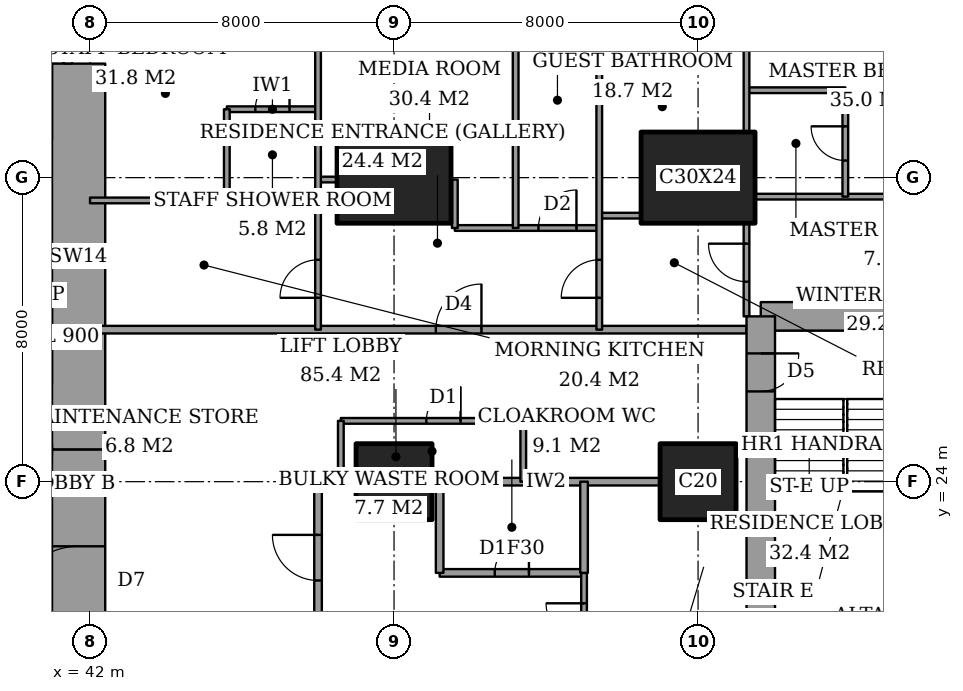
"""IFC4 building model, lengths in metres.
Left out: names, types, materials, properties, quantities, classifications, styles, units other than length and angle.
Written with IfcOpenShell. Run it as: python <this file> out.ifc"""

import sys

from ifc_helpers import new_model, si_unit, direction, frame, frame_2d, origin, origin_2d, place, context, subcontext, project, spatial, rectangle, extrude, element, fill, save


model = new_model("IFC4")
c1 = context("Model", 3, precision=1e-05, world=origin(), true_north=direction((0.0, 1.0)))
c2 = subcontext(c1, "Body", "Model", "MODEL_VIEW")
j1 = project(units=[si_unit("LENGTHUNIT", "METRE"), si_unit("PLANEANGLEUNIT", "RADIAN")], contexts=[c1])
p1 = place(None, origin())
s1 = spatial("IfcSite", under=j1, at=p1, CompositionType="ELEMENT")
p2 = place(p1, origin())
s2 = spatial("IfcBuilding", under=s1, at=p2, CompositionType="ELEMENT")
p3 = place(p2, frame((0.0, 0.0, 135.8)))
s3 = spatial("IfcBuildingStorey", under=s2, at=p3, CompositionType="ELEMENT", Elevation=135.8)
p4 = place(p3, frame((50.0, 24.0, 0.0), z_axis=(0.0, 0.0, 1.0), x_axis=(1.0, 0.0, 0.0)))
e1 = element("IfcColumn", 1, at=p4, inside=s3, PredefinedType="COLUMN", context=c2, shape_type="SweptSolid", body=[
    extrude(rectangle(XDim=2.0, YDim=2.0, at=origin_2d()), origin(), (0.0, 0.0, 1.0), 3.6),
])
p5 = place(p3, frame((50.0, 32.0, 0.0), z_axis=(0.0, 0.0, 1.0), x_axis=(1.0, 0.0, 0.0)))
e2 = element("IfcColumn", 2, at=p5, inside=s3, PredefinedType="COLUMN", context=c2, shape_type="SweptSolid", body=[
    extrude(rectangle(XDim=3.0, YDim=2.4, at=origin_2d()), origin(), (0.0, 0.0, 1.0), 3.6),
])
p6 = place(p3, frame((58.0, 24.0, 0.0), z_axis=(0.0, 0.0, 1.0), x_axis=(1.0, 0.0, 0.0)))
e3 = element("IfcColumn", 3, at=p6, inside=s3, PredefinedType="COLUMN", context=c2, shape_type="SweptSolid", body=[
    extrude(rectangle(XDim=2.0, YDim=2.0, at=origin_2d()), origin(), (0.0, 0.0, 1.0), 3.6),
])
p7 = place(p3, frame((58.0, 32.0, 0.0), z_axis=(0.0, 0.0, 1.0), x_axis=(1.0, 0.0, 0.0)))
e4 = element("IfcColumn", 4, at=p7, inside=s3, PredefinedType="COLUMN", context=c2, shape_type="SweptSolid", body=[
    extrude(rectangle(XDim=3.0, YDim=2.4, at=origin_2d()), origin(), (0.0, 0.0, 1.0), 3.6),
])
p8 = place(p3, frame((41.7, 13.0, 0.0), z_axis=(0.0, 0.0, 1.0), x_axis=(0.0, 1.0, 0.0)))
e5 = element("IfcWall", 5, at=p8, inside=s3, PredefinedType="SHEAR", context=c2, shape_type="SweptSolid", body=[
    extrude(rectangle(XDim=11.85, YDim=1.4, at=frame_2d((5.925, 0.0))), origin(), (0.0, 0.0, 1.0), 3.6),
])
p9 = place(p8, frame((7.5, 0.0, 0.0)))
e6 = element("IfcOpeningElement", 6, at=p9, cuts=e5, PredefinedType="OPENING", context=c2, shape_type="SweptSolid", body=[
    extrude(rectangle(XDim=1.8, YDim=2.4, at=frame_2d((0.9, 1.2))), frame((0.0, 0.71, 0.0), z_axis=(0.0, -1.0, 0.0), x_axis=(1.0, 0.0, 0.0)), (0.0, 0.0, 1.0), 1.42),
])
p10 = place(p3, frame((41.7, 24.85, 0.0), z_axis=(0.0, 0.0, 1.0), x_axis=(0.0, 1.0, 0.0)))
e7 = element("IfcWall", 7, at=p10, inside=s3, PredefinedType="SHEAR", context=c2, shape_type="SweptSolid", body=[
    extrude(rectangle(XDim=10.15, YDim=1.4, at=frame_2d((5.075, 0.0))), origin(), (0.0, 0.0, 1.0), 3.6),
])
p11 = place(p3, frame((64.1, 28.35, 0.0), z_axis=(0.0, 0.0, 1.0), x_axis=(-1.0, 0.0, 0.0)))
e8 = element("IfcWall", 8, at=p11, inside=s3, PredefinedType="SHEAR", context=c2, shape_type="SweptSolid", body=[
    extrude(rectangle(XDim=4.45, YDim=0.75, at=frame_2d((2.225, 0.0))), origin(), (0.0, 0.0, 1.0), 3.6),
])
p12 = place(p3, frame((59.65, 28.35, 0.0), z_axis=(0.0, 0.0, 1.0), x_axis=(0.0, -1.0, 0.0)))
e9 = element("IfcWall", 9, at=p12, inside=s3, PredefinedType="SHEAR", context=c2, shape_type="SweptSolid", body=[
    extrude(rectangle(XDim=8.7, YDim=0.75, at=frame_2d((4.35, 0.0))), origin(), (0.0, 0.0, 1.0), 3.6),
])
p13 = place(p12, frame((0.975, 0.0, 0.0)))
e10 = element("IfcOpeningElement", 10, at=p13, cuts=e9, PredefinedType="OPENING", context=c2, shape_type="SweptSolid", body=[
    extrude(rectangle(XDim=1.0, YDim=2.1, at=frame_2d((0.5, 1.05))), frame((0.0, 0.385, 0.0), z_axis=(0.0, -1.0, 0.0), x_axis=(1.0, 0.0, 0.0)), (0.0, 0.0, 1.0), 0.77),
])
p14 = place(p3, frame((51.2, 21.6, 0.0), z_axis=(0.0, 0.0, 1.0), x_axis=(1.0, 0.0, 0.0)))
e11 = element("IfcWall", 11, at=p14, inside=s3, PredefinedType="PARTITIONING", context=c2, shape_type="SweptSolid", body=[
    extrude(rectangle(XDim=3.8, YDim=0.2, at=frame_2d((1.9, 0.0))), origin(), (0.0, 0.0, 1.0), 3.35),
])
p15 = place(p14, frame((1.45, 0.0, 0.0)))
e12 = element("IfcOpeningElement", 12, at=p15, cuts=e11, PredefinedType="OPENING", context=c2, shape_type="SweptSolid", body=[
    extrude(rectangle(XDim=0.9, YDim=2.1, at=frame_2d((0.45, 1.05))), frame((0.0, 0.11, 0.0), z_axis=(0.0, -1.0, 0.0), x_axis=(1.0, 0.0, 0.0)), (0.0, 0.0, 1.0), 0.22),
])
p16 = place(p3, frame((48.0, 24.0, 0.0), z_axis=(0.0, 0.0, 1.0), x_axis=(1.0, 0.0, 0.0)))
e13 = element("IfcWall", 13, at=p16, inside=s3, PredefinedType="PARTITIONING", context=c2, shape_type="SweptSolid", body=[
    extrude(rectangle(XDim=1.0, YDim=0.2, at=frame_2d((0.5, 0.0))), origin(), (0.0, 0.0, 1.0), 3.35),
])
p17 = place(p3, frame((51.0, 24.0, 0.0), z_axis=(0.0, 0.0, 1.0), x_axis=(1.0, 0.0, 0.0)))
e14 = element("IfcWall", 14, at=p17, inside=s3, PredefinedType="PARTITIONING", context=c2, shape_type="SweptSolid", body=[
    extrude(rectangle(XDim=6.0, YDim=0.2, at=frame_2d((3.0, 0.0))), origin(), (0.0, 0.0, 1.0), 3.35),
])
p18 = place(p3, frame((48.6, 25.6, 0.0), z_axis=(0.0, 0.0, 1.0), x_axis=(1.0, 0.0, 0.0)))
e15 = element("IfcWall", 15, at=p18, inside=s3, PredefinedType="PARTITIONING", context=c2, shape_type="SweptSolid", body=[
    extrude(rectangle(XDim=4.8, YDim=0.15, at=frame_2d((2.4, 0.0))), origin(), (0.0, 0.0, 1.0), 3.35),
])
p19 = place(p18, frame((2.25, 0.0, 0.0)))
e16 = element("IfcOpeningElement", 16, at=p19, cuts=e15, PredefinedType="OPENING", context=c2, shape_type="SweptSolid", body=[
    extrude(rectangle(XDim=0.9, YDim=2.1, at=frame_2d((0.45, 1.05))), frame((0.0, 0.085, 0.0), z_axis=(0.0, -1.0, 0.0), x_axis=(1.0, 0.0, 0.0)), (0.0, 0.0, 1.0), 0.17),
])
p20 = place(p3, frame((42.0, 28.0, 0.0), z_axis=(0.0, 0.0, 1.0), x_axis=(1.0, 0.0, 0.0)))
e17 = element("IfcWall", 17, at=p20, inside=s3, PredefinedType="PARTITIONING", context=c2, shape_type="SweptSolid", body=[
    extrude(rectangle(XDim=17.275, YDim=0.2, at=frame_2d((8.637, 0.0))), origin(), (0.0, 0.0, 1.0), 3.35),
])
p21 = place(p20, frame((9.1, 0.0, 0.0)))
e18 = element("IfcOpeningElement", 18, at=p21, cuts=e17, PredefinedType="OPENING", context=c2, shape_type="SweptSolid", body=[
    extrude(rectangle(XDim=1.2, YDim=2.4, at=frame_2d((0.6, 1.2))), frame((0.0, 0.11, 0.0), z_axis=(0.0, -1.0, 0.0), x_axis=(1.0, 0.0, 0.0)), (0.0, 0.0, 1.0), 0.22),
])
p22 = place(p3, frame((51.6, 30.675, 0.0), z_axis=(0.0, 0.0, 1.0), x_axis=(1.0, 0.0, 0.0)))
e19 = element("IfcWall", 19, at=p22, inside=s3, PredefinedType="PARTITIONING", context=c2, shape_type="SweptSolid", body=[
    extrude(rectangle(XDim=3.8, YDim=0.15, at=frame_2d((1.9, 0.0))), origin(), (0.0, 0.0, 1.0), 3.35),
])
p23 = place(p22, frame((2.2, 0.0, 0.0)))
e20 = element("IfcOpeningElement", 20, at=p23, cuts=e19, PredefinedType="OPENING", context=c2, shape_type="SweptSolid", body=[
    extrude(rectangle(XDim=1.0, YDim=2.1, at=frame_2d((0.5, 1.05))), frame((0.0, 0.085, 0.0), z_axis=(0.0, -1.0, 0.0), x_axis=(1.0, 0.0, 0.0)), (0.0, 0.0, 1.0), 0.17),
])
p24 = place(p3, frame((55.4, 31.0, 0.0), z_axis=(0.0, 0.0, 1.0), x_axis=(1.0, 0.0, 0.0)))
e21 = element("IfcWall", 21, at=p24, inside=s3, PredefinedType="PARTITIONING", context=c2, shape_type="SweptSolid", body=[
    extrude(rectangle(XDim=1.1, YDim=0.15, at=frame_2d((0.55, 0.0))), origin(), (0.0, 0.0, 1.0), 3.35),
])
p25 = place(p3, frame((42.0, 31.4, 0.0), z_axis=(0.0, 0.0, 1.0), x_axis=(1.0, 0.0, 0.0)))
e22 = element("IfcWall", 22, at=p25, inside=s3, PredefinedType="PARTITIONING", context=c2, shape_type="SweptSolid", body=[
    extrude(rectangle(XDim=6.0, YDim=0.15, at=frame_2d((3.0, 0.0))), origin(), (0.0, 0.0, 1.0), 3.35),
])
p26 = place(p3, frame((59.5, 31.5, 0.0), z_axis=(0.0, 0.0, 1.0), x_axis=(1.0, 0.0, 0.0)))
e23 = element("IfcWall", 23, at=p26, inside=s3, PredefinedType="PARTITIONING", context=c2, shape_type="SweptSolid", body=[
    extrude(rectangle(XDim=5.15, YDim=0.15, at=frame_2d((2.575, 0.0))), origin(), (0.0, 0.0, 1.0), 3.35),
])
p27 = place(p3, frame((48.0, 31.95, 0.0), z_axis=(0.0, 0.0, 1.0), x_axis=(1.0, 0.0, 0.0)))
e24 = element("IfcWall", 24, at=p27, inside=s3, PredefinedType="PARTITIONING", context=c2, shape_type="SweptSolid", body=[
    extrude(rectangle(XDim=0.5, YDim=0.15, at=frame_2d((0.25, 0.0))), origin(), (0.0, 0.0, 1.0), 2.634),
])
p28 = place(p3, frame((45.6, 33.8, 0.0), z_axis=(0.0, 0.0, 1.0), x_axis=(1.0, 0.0, 0.0)))
e25 = element("IfcWall", 25, at=p28, inside=s3, PredefinedType="PARTITIONING", context=c2, shape_type="SweptSolid", body=[
    extrude(rectangle(XDim=2.4, YDim=0.15, at=frame_2d((1.2, 0.0))), origin(), (0.0, 0.0, 1.0), 3.35),
])
p29 = place(p28, frame((0.75, 0.0, 0.0)))
e26 = element("IfcOpeningElement", 26, at=p29, cuts=e25, PredefinedType="OPENING", context=c2, shape_type="SweptSolid", body=[
    extrude(rectangle(XDim=0.9, YDim=2.1, at=frame_2d((0.45, 1.05))), frame((0.0, 0.085, 0.0), z_axis=(0.0, -1.0, 0.0), x_axis=(1.0, 0.0, 0.0)), (0.0, 0.0, 1.0), 0.17),
])
p30 = place(p3, frame((59.275, 34.3, 0.0), z_axis=(0.0, 0.0, 1.0), x_axis=(1.0, 0.0, 0.0)))
e27 = element("IfcWall", 27, at=p30, inside=s3, PredefinedType="PARTITIONING", context=c2, shape_type="SweptSolid", body=[
    extrude(rectangle(XDim=2.6, YDim=0.15, at=frame_2d((1.3, 0.0))), origin(), (0.0, 0.0, 1.0), 3.35),
])
p31 = place(p3, frame((45.6, 31.4, 0.0), z_axis=(0.0, 0.0, 1.0), x_axis=(0.0, 1.0, 0.0)))
e28 = element("IfcWall", 28, at=p31, inside=s3, PredefinedType="PARTITIONING", context=c2, shape_type="SweptSolid", body=[
    extrude(rectangle(XDim=2.4, YDim=0.15, at=frame_2d((1.2, 0.0))), origin(), (0.0, 0.0, 1.0), 3.35),
])
p32 = place(p3, frame((48.0, 19.0, 0.0), z_axis=(0.0, 0.0, 1.0), x_axis=(0.0, 1.0, 0.0)))
e29 = element("IfcWall", 29, at=p32, inside=s3, PredefinedType="PARTITIONING", context=c2, shape_type="SweptSolid", body=[
    extrude(rectangle(XDim=5.0, YDim=0.2, at=frame_2d((2.5, 0.0))), origin(), (0.0, 0.0, 1.0), 3.35),
])
p33 = place(p32, frame((2.4, 0.0, 0.0)))
e30 = element("IfcOpeningElement", 30, at=p33, cuts=e29, PredefinedType="OPENING", context=c2, shape_type="SweptSolid", body=[
    extrude(rectangle(XDim=1.2, YDim=2.4, at=frame_2d((0.6, 1.2))), frame((0.0, 0.11, 0.0), z_axis=(0.0, -1.0, 0.0), x_axis=(1.0, 0.0, 0.0)), (0.0, 0.0, 1.0), 0.22),
])
p34 = place(p3, frame((48.0, 28.0, 0.0), z_axis=(0.0, 0.0, 1.0), x_axis=(0.0, 1.0, 0.0)))
e31 = element("IfcWall", 31, at=p34, inside=s3, PredefinedType="PARTITIONING", context=c2, shape_type="SweptSolid", body=[
    extrude(rectangle(XDim=9.4, YDim=0.15, at=frame_2d((4.7, 0.0))), origin(), (0.0, 0.0, 1.0), 3.35),
])
p35 = place(p34, frame((0.837, 0.0, 0.0)))
e32 = element("IfcOpeningElement", 32, at=p35, cuts=e31, PredefinedType="OPENING", context=c2, shape_type="SweptSolid", body=[
    extrude(rectangle(XDim=1.0, YDim=2.1, at=frame_2d((0.5, 1.05))), frame((0.0, 0.085, 0.0), z_axis=(0.0, -1.0, 0.0), x_axis=(1.0, 0.0, 0.0)), (0.0, 0.0, 1.0), 0.17),
])
p36 = place(p3, frame((48.6, 24.0, 0.0), z_axis=(0.0, 0.0, 1.0), x_axis=(0.0, 1.0, 0.0)))
e33 = element("IfcWall", 33, at=p36, inside=s3, PredefinedType="PARTITIONING", context=c2, shape_type="SweptSolid", body=[
    extrude(rectangle(XDim=1.6, YDim=0.15, at=frame_2d((0.8, 0.0))), origin(), (0.0, 0.0, 1.0), 3.35),
])
p37 = place(p3, frame((51.2, 21.6, 0.0), z_axis=(0.0, 0.0, 1.0), x_axis=(0.0, 1.0, 0.0)))
e34 = element("IfcWall", 34, at=p37, inside=s3, PredefinedType="PARTITIONING", context=c2, shape_type="SweptSolid", body=[
    extrude(rectangle(XDim=2.4, YDim=0.2, at=frame_2d((1.2, 0.0))), origin(), (0.0, 0.0, 1.0), 3.35),
])
p38 = place(p3, frame((51.6, 30.675, 0.0), z_axis=(0.0, 0.0, 1.0), x_axis=(0.0, 1.0, 0.0)))
e35 = element("IfcWall", 35, at=p38, inside=s3, PredefinedType="PARTITIONING", context=c2, shape_type="SweptSolid", body=[
    extrude(rectangle(XDim=1.275, YDim=0.15, at=frame_2d((0.637, 0.0))), origin(), (0.0, 0.0, 1.0), 3.35),
])
p39 = place(p3, frame((53.2, 30.675, 0.0), z_axis=(0.0, 0.0, 1.0), x_axis=(0.0, 1.0, 0.0)))
e36 = element("IfcWall", 36, at=p39, inside=s3, PredefinedType="PARTITIONING", context=c2, shape_type="SweptSolid", body=[
    extrude(rectangle(XDim=6.725, YDim=0.15, at=frame_2d((3.362, 0.0))), origin(), (0.0, 0.0, 1.0), 3.35),
])
p40 = place(p3, frame((53.4, 24.0, 0.0), z_axis=(0.0, 0.0, 1.0), x_axis=(0.0, 1.0, 0.0)))
e37 = element("IfcWall", 37, at=p40, inside=s3, PredefinedType="PARTITIONING", context=c2, shape_type="SweptSolid", body=[
    extrude(rectangle(XDim=1.6, YDim=0.15, at=frame_2d((0.8, 0.0))), origin(), (0.0, 0.0, 1.0), 3.35),
])
p41 = place(p3, frame((55.0, 21.6, 0.0), z_axis=(0.0, 0.0, 1.0), x_axis=(0.0, 1.0, 0.0)))
e38 = element("IfcWall", 38, at=p41, inside=s3, PredefinedType="PARTITIONING", context=c2, shape_type="SweptSolid", body=[
    extrude(rectangle(XDim=2.4, YDim=0.2, at=frame_2d((1.2, 0.0))), origin(), (0.0, 0.0, 1.0), 3.35),
])
p42 = place(p3, frame((55.0, 10.6, 0.0), z_axis=(0.0, 0.0, 1.0), x_axis=(0.0, 1.0, 0.0)))
e39 = element("IfcWall", 39, at=p42, inside=s3, PredefinedType="PARTITIONING", context=c2, shape_type="SweptSolid", body=[
    extrude(rectangle(XDim=11.0, YDim=0.15, at=frame_2d((5.5, 0.0))), origin(), (0.0, 0.0, 1.0), 3.35),
])
p43 = place(p42, frame((9.2, 0.0, 0.0)))
e40 = element("IfcOpeningElement", 40, at=p43, cuts=e39, PredefinedType="OPENING", context=c2, shape_type="SweptSolid", body=[
    extrude(rectangle(XDim=1.0, YDim=2.1, at=frame_2d((0.5, 1.05))), frame((0.0, 0.085, 0.0), z_axis=(0.0, -1.0, 0.0), x_axis=(1.0, 0.0, 0.0)), (0.0, 0.0, 1.0), 0.17),
])
p44 = place(p3, frame((55.4, 28.0, 0.0), z_axis=(0.0, 0.0, 1.0), x_axis=(0.0, 1.0, 0.0)))
e41 = element("IfcWall", 41, at=p44, inside=s3, PredefinedType="PARTITIONING", context=c2, shape_type="SweptSolid", body=[
    extrude(rectangle(XDim=9.4, YDim=0.15, at=frame_2d((4.7, 0.0))), origin(), (0.0, 0.0, 1.0), 3.35),
])
p45 = place(p44, frame((0.837, 0.0, 0.0)))
e42 = element("IfcOpeningElement", 42, at=p45, cuts=e41, PredefinedType="OPENING", context=c2, shape_type="SweptSolid", body=[
    extrude(rectangle(XDim=1.0, YDim=2.1, at=frame_2d((0.5, 1.05))), frame((0.0, 0.085, 0.0), z_axis=(0.0, -1.0, 0.0), x_axis=(1.0, 0.0, 0.0)), (0.0, 0.0, 1.0), 0.17),
])
p46 = place(p3, frame((59.275, 28.35, 0.0), z_axis=(0.0, 0.0, 1.0), x_axis=(0.0, 1.0, 0.0)))
e43 = element("IfcWall", 43, at=p46, inside=s3, PredefinedType="PARTITIONING", context=c2, shape_type="SweptSolid", body=[
    extrude(rectangle(XDim=2.45, YDim=0.15, at=frame_2d((1.225, 0.0))), origin(), (0.0, 0.0, 1.0), 3.35),
])
p47 = place(p46, frame((0.913, 0.0, 0.0)))
e44 = element("IfcOpeningElement", 44, at=p47, cuts=e43, PredefinedType="OPENING", context=c2, shape_type="SweptSolid", body=[
    extrude(rectangle(XDim=1.0, YDim=2.1, at=frame_2d((0.5, 1.05))), frame((0.0, 0.085, 0.0), z_axis=(0.0, -1.0, 0.0), x_axis=(1.0, 0.0, 0.0)), (0.0, 0.0, 1.0), 0.17),
])
p48 = place(p3, frame((59.275, 33.2, 0.0), z_axis=(0.0, 0.0, 1.0), x_axis=(0.0, 1.0, 0.0)))
e45 = element("IfcWall", 45, at=p48, inside=s3, PredefinedType="PARTITIONING", context=c2, shape_type="SweptSolid", body=[
    extrude(rectangle(XDim=4.2, YDim=0.15, at=frame_2d((2.1, 0.0))), origin(), (0.0, 0.0, 1.0), 3.35),
])
p49 = place(p3, frame((61.875, 31.5, 0.0), z_axis=(0.0, 0.0, 1.0), x_axis=(0.0, 1.0, 0.0)))
e46 = element("IfcWall", 46, at=p49, inside=s3, PredefinedType="PARTITIONING", context=c2, shape_type="SweptSolid", body=[
    extrude(rectangle(XDim=2.8, YDim=0.15, at=frame_2d((1.4, 0.0))), origin(), (0.0, 0.0, 1.0), 3.35),
])
p50 = place(p49, frame((0.95, 0.0, 0.0)))
e47 = element("IfcOpeningElement", 47, at=p50, cuts=e46, PredefinedType="OPENING", context=c2, shape_type="SweptSolid", body=[
    extrude(rectangle(XDim=0.9, YDim=2.1, at=frame_2d((0.45, 1.05))), frame((0.0, 0.085, 0.0), z_axis=(0.0, -1.0, 0.0), x_axis=(1.0, 0.0, 0.0)), (0.0, 0.0, 1.0), 0.17),
])
p51 = place(p43, origin())
e48 = element("IfcDoor", 48, at=p51, inside=s3, OperationType="SINGLE_SWING_LEFT", PredefinedType="DOOR", context=c2, shape_type="SweptSolid", body=[
    extrude(rectangle(XDim=1.0, YDim=2.1, at=frame_2d((0.5, 1.05))), frame((0.0, 0.025, 0.0), z_axis=(0.0, -1.0, 0.0), x_axis=(1.0, 0.0, 0.0)), (0.0, 0.0, 1.0), 0.05),
])
fill(e40, e48)
p52 = place(p15, origin())
e49 = element("IfcDoor", 49, at=p52, inside=s3, OperationType="SINGLE_SWING_LEFT", PredefinedType="DOOR", context=c2, shape_type="SweptSolid", body=[
    extrude(rectangle(XDim=0.9, YDim=2.1, at=frame_2d((0.45, 1.05))), frame((0.0, 0.025, 0.0), z_axis=(0.0, -1.0, 0.0), x_axis=(1.0, 0.0, 0.0)), (0.0, 0.0, 1.0), 0.05),
])
fill(e12, e49)
p53 = place(p33, origin())
e50 = element("IfcDoor", 50, at=p53, inside=s3, OperationType="SINGLE_SWING_LEFT", PredefinedType="DOOR", context=c2, shape_type="SweptSolid", body=[
    extrude(rectangle(XDim=1.2, YDim=2.4, at=frame_2d((0.6, 1.2))), frame((0.0, 0.025, 0.0), z_axis=(0.0, -1.0, 0.0), x_axis=(1.0, 0.0, 0.0)), (0.0, 0.0, 1.0), 0.05),
])
fill(e30, e50)
p54 = place(p50, origin())
e51 = element("IfcDoor", 51, at=p54, inside=s3, OperationType="SINGLE_SWING_LEFT", PredefinedType="DOOR", context=c2, shape_type="SweptSolid", body=[
    extrude(rectangle(XDim=0.9, YDim=2.1, at=frame_2d((0.45, 1.05))), frame((0.0, 0.025, 0.0), z_axis=(0.0, -1.0, 0.0), x_axis=(1.0, 0.0, 0.0)), (0.0, 0.0, 1.0), 0.05),
])
fill(e47, e51)
p55 = place(p47, origin())
e52 = element("IfcDoor", 52, at=p55, inside=s3, OperationType="SINGLE_SWING_LEFT", PredefinedType="DOOR", context=c2, shape_type="SweptSolid", body=[
    extrude(rectangle(XDim=1.0, YDim=2.1, at=frame_2d((0.5, 1.05))), frame((0.0, 0.025, 0.0), z_axis=(0.0, -1.0, 0.0), x_axis=(1.0, 0.0, 0.0)), (0.0, 0.0, 1.0), 0.05),
])
fill(e44, e52)
p56 = place(p45, origin())
e53 = element("IfcDoor", 53, at=p56, inside=s3, OperationType="SINGLE_SWING_RIGHT", PredefinedType="DOOR", context=c2, shape_type="SweptSolid", body=[
    extrude(rectangle(XDim=1.0, YDim=2.1, at=frame_2d((0.5, 1.05))), frame((0.0, 0.025, 0.0), z_axis=(0.0, -1.0, 0.0), x_axis=(1.0, 0.0, 0.0)), (0.0, 0.0, 1.0), 0.05),
])
fill(e42, e53)
p57 = place(p21, origin())
e54 = element("IfcDoor", 54, at=p57, inside=s3, OperationType="SINGLE_SWING_LEFT", PredefinedType="DOOR", context=c2, shape_type="SweptSolid", body=[
    extrude(rectangle(XDim=1.2, YDim=2.4, at=frame_2d((0.6, 1.2))), frame((0.0, 0.025, 0.0), z_axis=(0.0, -1.0, 0.0), x_axis=(1.0, 0.0, 0.0)), (0.0, 0.0, 1.0), 0.05),
])
fill(e18, e54)
p58 = place(p23, origin())
e55 = element("IfcDoor", 55, at=p58, inside=s3, OperationType="SINGLE_SWING_LEFT", PredefinedType="DOOR", context=c2, shape_type="SweptSolid", body=[
    extrude(rectangle(XDim=1.0, YDim=2.1, at=frame_2d((0.5, 1.05))), frame((0.0, 0.025, 0.0), z_axis=(0.0, -1.0, 0.0), x_axis=(1.0, 0.0, 0.0)), (0.0, 0.0, 1.0), 0.05),
])
fill(e20, e55)
p59 = place(p29, origin())
e56 = element("IfcDoor", 56, at=p59, inside=s3, OperationType="SINGLE_SWING_LEFT", PredefinedType="DOOR", context=c2, shape_type="SweptSolid", body=[
    extrude(rectangle(XDim=0.9, YDim=2.1, at=frame_2d((0.45, 1.05))), frame((0.0, 0.025, 0.0), z_axis=(0.0, -1.0, 0.0), x_axis=(1.0, 0.0, 0.0)), (0.0, 0.0, 1.0), 0.05),
])
fill(e26, e56)
p60 = place(p35, origin())
e57 = element("IfcDoor", 57, at=p60, inside=s3, OperationType="SINGLE_SWING_RIGHT", PredefinedType="DOOR", context=c2, shape_type="SweptSolid", body=[
    extrude(rectangle(XDim=1.0, YDim=2.1, at=frame_2d((0.5, 1.05))), frame((0.0, 0.025, 0.0), z_axis=(0.0, -1.0, 0.0), x_axis=(1.0, 0.0, 0.0)), (0.0, 0.0, 1.0), 0.05),
])
fill(e32, e57)
p61 = place(p19, origin())
e58 = element("IfcDoor", 58, at=p61, inside=s3, OperationType="SINGLE_SWING_LEFT", PredefinedType="DOOR", context=c2, shape_type="SweptSolid", body=[
    extrude(rectangle(XDim=0.9, YDim=2.1, at=frame_2d((0.45, 1.05))), frame((0.0, 0.025, 0.0), z_axis=(0.0, -1.0, 0.0), x_axis=(1.0, 0.0, 0.0)), (0.0, 0.0, 1.0), 0.05),
])
fill(e16, e58)
p62 = place(p9, origin())
e59 = element("IfcDoor", 59, at=p62, inside=s3, OperationType="DOUBLE_DOOR_DOUBLE_SWING", PredefinedType="DOOR", context=c2, shape_type="SweptSolid", body=[
    extrude(rectangle(XDim=1.8, YDim=2.4, at=frame_2d((0.9, 1.2))), frame((0.0, 0.025, 0.0), z_axis=(0.0, -1.0, 0.0), x_axis=(1.0, 0.0, 0.0)), (0.0, 0.0, 1.0), 0.05),
])
fill(e6, e59)
p63 = place(p13, origin())
e60 = element("IfcDoor", 60, at=p63, inside=s3, OperationType="SINGLE_SWING_RIGHT", PredefinedType="DOOR", context=c2, shape_type="SweptSolid", body=[
    extrude(rectangle(XDim=1.0, YDim=2.1, at=frame_2d((0.5, 1.05))), frame((0.0, 0.025, 0.0), z_axis=(0.0, -1.0, 0.0), x_axis=(1.0, 0.0, 0.0)), (0.0, 0.0, 1.0), 0.05),
])
fill(e10, e60)
save(model, sys.argv[1])
